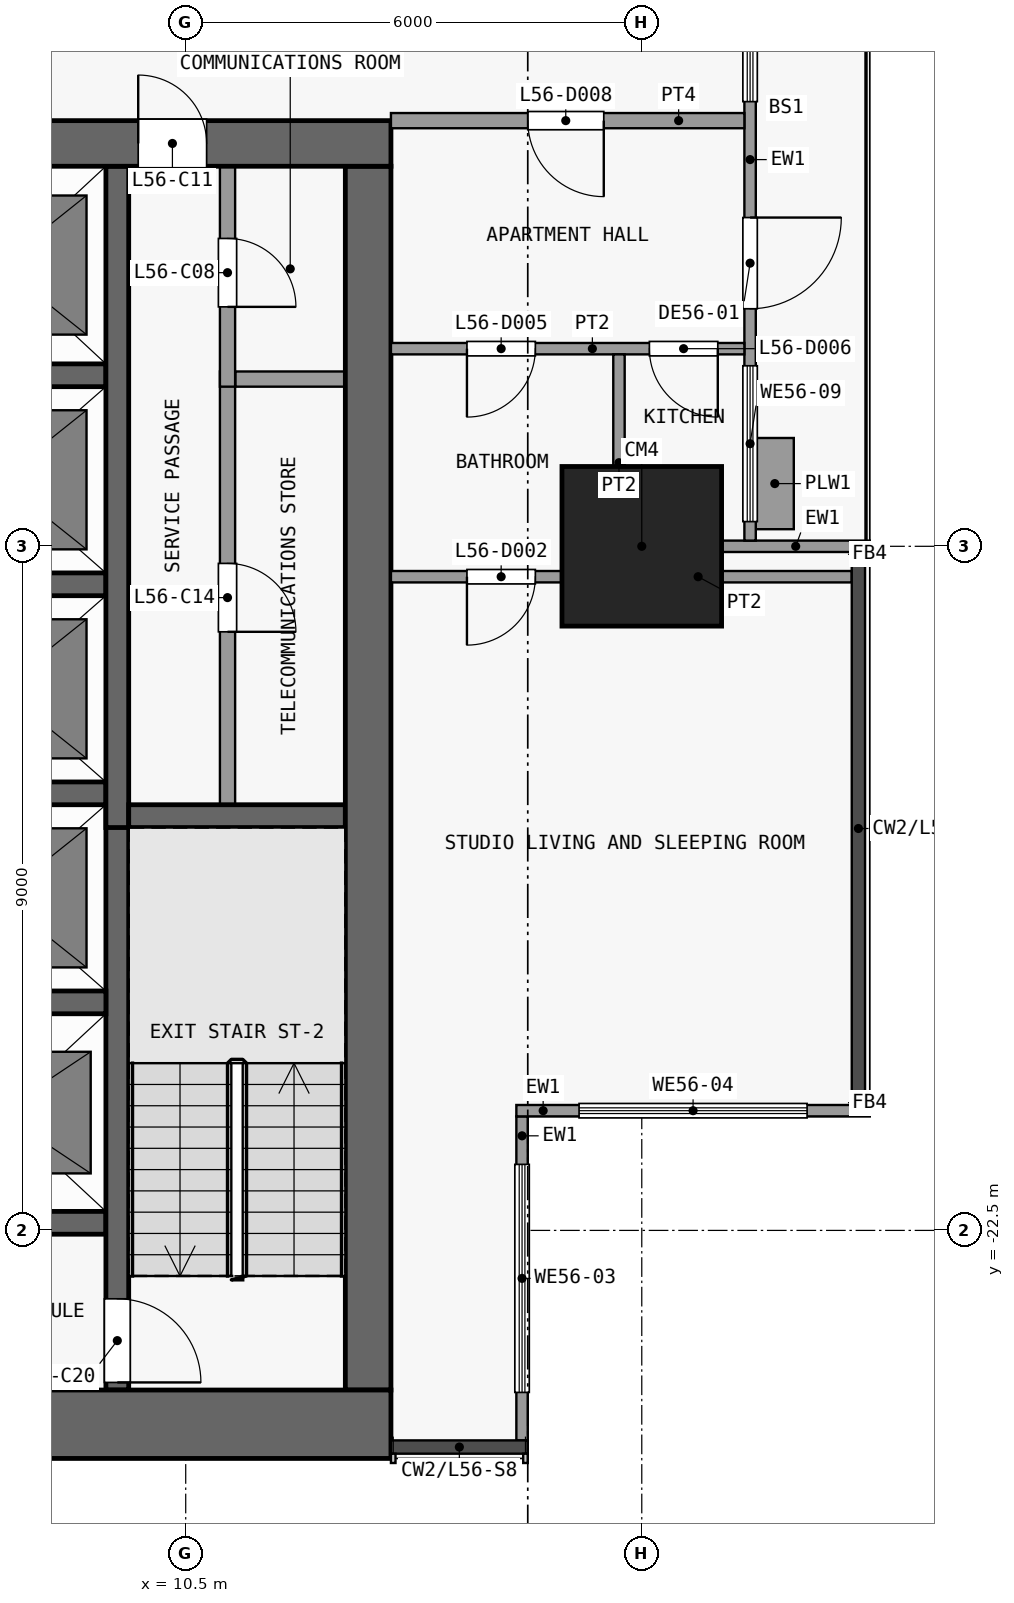
"""IFC4 building model, lengths in metres.
Left out: names, types, materials, properties, quantities, classifications, styles, units other than length and angle.
Written with IfcOpenShell. Run it as: python <this file> out.ifc"""

import sys

from ifc_helpers import new_model, si_unit, direction, frame, frame_2d, origin, origin_2d, place, context, subcontext, project, spatial, rectangle, extrude, element, fill, save


model = new_model("IFC4")
c1 = context("Model", 3, precision=1e-05, world=origin(), true_north=direction((0.0, 1.0)))
c2 = subcontext(c1, "Body", "Model", "MODEL_VIEW")
j1 = project(units=[si_unit("LENGTHUNIT", "METRE"), si_unit("PLANEANGLEUNIT", "RADIAN")], contexts=[c1])
p1 = place(None, origin())
s1 = spatial("IfcSite", under=j1, at=p1, CompositionType="ELEMENT")
p2 = place(p1, origin())
s2 = spatial("IfcBuilding", under=s1, at=p2, CompositionType="ELEMENT")
p3 = place(p2, frame((0.0, 0.0, 223.1)))
s3 = spatial("IfcBuildingStorey", under=s2, at=p3, CompositionType="ELEMENT", Elevation=223.1)
p4 = place(p3, frame((16.5, -13.5, 0.0), z_axis=(0.0, 0.0, 1.0), x_axis=(1.0, 0.0, 0.0)))
e1 = element("IfcColumn", 1, at=p4, inside=s3, PredefinedType="COLUMN", context=c2, shape_type="SweptSolid", body=[
    extrude(rectangle(XDim=2.1, YDim=2.1, at=origin_2d()), origin(), (0.0, 0.0, 1.0), 3.6),
])
p5 = place(p3, frame((-13.2, -25.05, 0.0), z_axis=(0.0, 0.0, 1.0), x_axis=(1.0, 0.0, 0.0)))
e2 = element("IfcWall", 2, at=p5, inside=s3, PredefinedType="SHEAR", context=c2, shape_type="SweptSolid", body=[
    extrude(rectangle(XDim=26.4, YDim=0.9, at=frame_2d((13.2, 0.0))), origin(), (0.0, 0.0, 1.0), 3.3),
])
p6 = place(p3, frame((-13.2, -8.2, 0.0), z_axis=(0.0, 0.0, 1.0), x_axis=(1.0, 0.0, 0.0)))
e3 = element("IfcWall", 3, at=p6, inside=s3, PredefinedType="SHEAR", context=c2, shape_type="SweptSolid", body=[
    extrude(rectangle(XDim=26.4, YDim=0.6, at=frame_2d((13.2, 0.0))), origin(), (0.0, 0.0, 1.0), 3.3),
])
p7 = place(p6, frame((7.5, 0.0, 0.0)))
e4 = element("IfcOpeningElement", 4, at=p7, cuts=e3, PredefinedType="OPENING", context=c2, shape_type="SweptSolid", body=[
    extrude(rectangle(XDim=1.8, YDim=2.1, at=frame_2d((0.9, 1.05))), frame((0.0, 0.31, 0.0), z_axis=(0.0, -1.0, 0.0), x_axis=(1.0, 0.0, 0.0)), (0.0, 0.0, 1.0), 0.62),
])
p8 = place(p6, frame((17.1, 0.0, 0.0)))
e5 = element("IfcOpeningElement", 5, at=p8, cuts=e3, PredefinedType="OPENING", context=c2, shape_type="SweptSolid", body=[
    extrude(rectangle(XDim=1.8, YDim=2.1, at=frame_2d((0.9, 1.05))), frame((0.0, 0.31, 0.0), z_axis=(0.0, -1.0, 0.0), x_axis=(1.0, 0.0, 0.0)), (0.0, 0.0, 1.0), 0.62),
])
p9 = place(p6, frame((2.425, 0.0, 0.0)))
e6 = element("IfcOpeningElement", 6, at=p9, cuts=e3, PredefinedType="OPENING", context=c2, shape_type="SweptSolid", body=[
    extrude(rectangle(XDim=0.9, YDim=2.1, at=frame_2d((0.45, 1.05))), frame((0.0, 0.31, 0.0), z_axis=(0.0, -1.0, 0.0), x_axis=(1.0, 0.0, 0.0)), (0.0, 0.0, 1.0), 0.62),
])
p10 = place(p6, frame((23.075, 0.0, 0.0)))
e7 = element("IfcOpeningElement", 7, at=p10, cuts=e3, PredefinedType="OPENING", context=c2, shape_type="SweptSolid", body=[
    extrude(rectangle(XDim=0.9, YDim=2.1, at=frame_2d((0.45, 1.05))), frame((0.0, 0.31, 0.0), z_axis=(0.0, -1.0, 0.0), x_axis=(1.0, 0.0, 0.0)), (0.0, 0.0, 1.0), 0.62),
])
p11 = place(p3, frame((12.9, -24.6, 0.0), z_axis=(0.0, 0.0, 1.0), x_axis=(0.0, 1.0, 0.0)))
e8 = element("IfcWall", 8, at=p11, inside=s3, PredefinedType="SHEAR", context=c2, shape_type="SweptSolid", body=[
    extrude(rectangle(XDim=16.1, YDim=0.6, at=frame_2d((8.05, 0.0))), origin(), (0.0, 0.0, 1.0), 3.3),
])
for number, where, z_axis, x_axis in (
    (9, (6.65, -22.4, 0.0), (0.0, 0.0, 1.0), (1.0, 0.0, 0.0)),
    (10, (6.65, -19.5, 0.0), (0.0, 0.0, 1.0), (1.0, 0.0, 0.0)),
):
    element("IfcWall", number, at=place(p3, frame(where, z_axis=z_axis, x_axis=x_axis)), inside=s3, PredefinedType="SHEAR", context=c2, shape_type="SweptSolid", body=[
        extrude(rectangle(XDim=2.8, YDim=0.3, at=frame_2d((1.4, 0.0))), origin(), (0.0, 0.0, 1.0), 3.3),
    ])
p12 = place(p3, frame((9.75, -17.05, 0.0), z_axis=(0.0, 0.0, 1.0), x_axis=(1.0, 0.0, 0.0)))
e11 = element("IfcWall", 11, at=p12, inside=s3, PredefinedType="SHEAR", context=c2, shape_type="SweptSolid", body=[
    extrude(rectangle(XDim=2.85, YDim=0.3, at=frame_2d((1.425, 0.0))), origin(), (0.0, 0.0, 1.0), 3.3),
])
for number, where, z_axis, x_axis in (
    (12, (6.65, -16.75, 0.0), (0.0, 0.0, 1.0), (1.0, 0.0, 0.0)),
    (13, (6.65, -14.0, 0.0), (0.0, 0.0, 1.0), (1.0, 0.0, 0.0)),
):
    element("IfcWall", number, at=place(p3, frame(where, z_axis=z_axis, x_axis=x_axis)), inside=s3, PredefinedType="SHEAR", context=c2, shape_type="SweptSolid", body=[
        extrude(rectangle(XDim=2.8, YDim=0.3, at=frame_2d((1.4, 0.0))), origin(), (0.0, 0.0, 1.0), 3.3),
    ])
p13 = place(p3, frame((11.15, -11.3, 0.0), z_axis=(0.0, 0.0, 1.0), x_axis=(1.0, 0.0, 0.0)))
e14 = element("IfcWall", 14, at=p13, inside=s3, PredefinedType="PARTITIONING", context=c2, shape_type="SweptSolid", body=[
    extrude(rectangle(XDim=1.45, YDim=0.2, at=frame_2d((0.725, 0.0))), origin(), (0.0, 0.0, 1.0), 3.3),
])
p14 = place(p3, frame((6.65, -11.25, 0.0), z_axis=(0.0, 0.0, 1.0), x_axis=(1.0, 0.0, 0.0)))
e15 = element("IfcWall", 15, at=p14, inside=s3, PredefinedType="SHEAR", context=c2, shape_type="SweptSolid", body=[
    extrude(rectangle(XDim=2.8, YDim=0.3, at=frame_2d((1.4, 0.0))), origin(), (0.0, 0.0, 1.0), 3.3),
])
p15 = place(p3, frame((9.6, -16.9, 0.0), z_axis=(0.0, 0.0, 1.0), x_axis=(0.0, -1.0, 0.0)))
e16 = element("IfcWall", 16, at=p15, inside=s3, PredefinedType="SHEAR", context=c2, shape_type="SweptSolid", body=[
    extrude(rectangle(XDim=7.7, YDim=0.3, at=frame_2d((3.85, 0.0))), origin(), (0.0, 0.0, 1.0), 3.3),
])
p16 = place(p15, frame((6.5, 0.0, 0.0)))
e17 = element("IfcOpeningElement", 17, at=p16, cuts=e16, PredefinedType="OPENING", context=c2, shape_type="SweptSolid", body=[
    extrude(rectangle(XDim=1.1, YDim=2.1, at=frame_2d((0.55, 1.05))), frame((0.0, 0.16, 0.0), z_axis=(0.0, -1.0, 0.0), x_axis=(1.0, 0.0, 0.0)), (0.0, 0.0, 1.0), 0.32),
])
p17 = place(p3, frame((9.6, -17.2, 0.0), z_axis=(0.0, 0.0, 1.0), x_axis=(0.0, 1.0, 0.0)))
e18 = element("IfcWall", 18, at=p17, inside=s3, PredefinedType="SHEAR", context=c2, shape_type="SweptSolid", body=[
    extrude(rectangle(XDim=8.7, YDim=0.3, at=frame_2d((4.35, 0.0))), origin(), (0.0, 0.0, 1.0), 3.3),
])
p18 = place(p3, frame((11.05, -11.2, 0.0), z_axis=(0.0, 0.0, 1.0), x_axis=(0.0, -1.0, 0.0)))
e19 = element("IfcWall", 19, at=p18, inside=s3, PredefinedType="PARTITIONING", context=c2, shape_type="SweptSolid", body=[
    extrude(rectangle(XDim=5.7, YDim=0.2, at=frame_2d((2.85, 0.0))), origin(), (0.0, 0.0, 1.0), 3.3),
])
p19 = place(p18, frame((2.525, 0.0, 0.0)))
e20 = element("IfcOpeningElement", 20, at=p19, cuts=e19, PredefinedType="OPENING", context=c2, shape_type="SweptSolid", body=[
    extrude(rectangle(XDim=0.9, YDim=2.1, at=frame_2d((0.45, 1.05))), frame((0.0, 0.11, 0.0), z_axis=(0.0, -1.0, 0.0), x_axis=(1.0, 0.0, 0.0)), (0.0, 0.0, 1.0), 0.22),
])
p20 = place(p3, frame((11.05, -8.5, 0.0), z_axis=(0.0, 0.0, 1.0), x_axis=(0.0, -1.0, 0.0)))
e21 = element("IfcWall", 21, at=p20, inside=s3, PredefinedType="PARTITIONING", context=c2, shape_type="SweptSolid", body=[
    extrude(rectangle(XDim=2.9, YDim=0.2, at=frame_2d((1.45, 0.0))), origin(), (0.0, 0.0, 1.0), 3.3),
])
p21 = place(p20, frame((0.95, 0.0, 0.0)))
e22 = element("IfcOpeningElement", 22, at=p21, cuts=e21, PredefinedType="OPENING", context=c2, shape_type="SweptSolid", body=[
    extrude(rectangle(XDim=0.9, YDim=2.1, at=frame_2d((0.45, 1.05))), frame((0.0, 0.11, 0.0), z_axis=(0.0, -1.0, 0.0), x_axis=(1.0, 0.0, 0.0)), (0.0, 0.0, 1.0), 0.22),
])
p22 = place(p3, frame((14.925, -21.0, 0.0), z_axis=(0.0, 0.0, 1.0), x_axis=(0.0, -1.0, 0.0)))
e23 = element("IfcWall", 23, at=p22, inside=s3, PredefinedType="SOLIDWALL", context=c2, shape_type="SweptSolid", body=[
    extrude(rectangle(XDim=4.262, YDim=0.15, at=frame_2d((2.131, 0.0))), origin(), (0.0, 0.0, 1.0), 3.3),
])
p23 = place(p22, frame((0.631, 0.0, 0.9)))
e24 = element("IfcOpeningElement", 24, at=p23, cuts=e23, PredefinedType="OPENING", context=c2, shape_type="SweptSolid", body=[
    extrude(rectangle(XDim=3.0, YDim=2.4, at=frame_2d((1.5, 1.2))), frame((0.0, 0.085, 0.0), z_axis=(0.0, -1.0, 0.0), x_axis=(1.0, 0.0, 0.0)), (0.0, 0.0, 1.0), 0.17),
])
p24 = place(p3, frame((19.5, -20.925, 0.0), z_axis=(0.0, 0.0, 1.0), x_axis=(-1.0, 0.0, 0.0)))
e25 = element("IfcWall", 25, at=p24, inside=s3, PredefinedType="SOLIDWALL", context=c2, shape_type="SweptSolid", body=[
    extrude(rectangle(XDim=4.65, YDim=0.15, at=frame_2d((2.325, 0.0))), origin(), (0.0, 0.0, 1.0), 3.3),
])
p25 = place(p24, frame((0.825, 0.0, 0.9)))
e26 = element("IfcOpeningElement", 26, at=p25, cuts=e25, PredefinedType="OPENING", context=c2, shape_type="SweptSolid", body=[
    extrude(rectangle(XDim=3.0, YDim=2.4, at=frame_2d((1.5, 1.2))), frame((0.0, 0.085, 0.0), z_axis=(0.0, -1.0, 0.0), x_axis=(1.0, 0.0, 0.0)), (0.0, 0.0, 1.0), 0.17),
])
p26 = place(p3, frame((17.55, -13.5, 0.0), z_axis=(0.0, 0.0, 1.0), x_axis=(1.0, 0.0, 0.0)))
e27 = element("IfcWall", 27, at=p26, inside=s3, PredefinedType="SOLIDWALL", context=c2, shape_type="SweptSolid", body=[
    extrude(rectangle(XDim=1.95, YDim=0.15, at=frame_2d((0.975, 0.0))), origin(), (0.0, 0.0, 1.0), 3.3),
])
p27 = place(p3, frame((17.925, -4.575, 0.0), z_axis=(0.0, 0.0, 1.0), x_axis=(0.0, -1.0, 0.0)))
e28 = element("IfcWall", 28, at=p27, inside=s3, PredefinedType="SOLIDWALL", context=c2, shape_type="SweptSolid", body=[
    extrude(rectangle(XDim=8.85, YDim=0.15, at=frame_2d((4.425, 0.0))), origin(), (0.0, 0.0, 1.0), 3.3),
])
p28 = place(p27, frame((4.6, 0.0, 0.0)))
e29 = element("IfcOpeningElement", 29, at=p28, cuts=e28, PredefinedType="OPENING", context=c2, shape_type="SweptSolid", body=[
    extrude(rectangle(XDim=1.2, YDim=2.4, at=frame_2d((0.6, 1.2))), frame((0.0, 0.085, 0.0), z_axis=(0.0, -1.0, 0.0), x_axis=(1.0, 0.0, 0.0)), (0.0, 0.0, 1.0), 0.17),
])
p29 = place(p27, frame((6.55, 0.0, 0.9)))
e30 = element("IfcOpeningElement", 30, at=p29, cuts=e28, PredefinedType="OPENING", context=c2, shape_type="SweptSolid", body=[
    extrude(rectangle(XDim=2.05, YDim=2.1, at=frame_2d((1.025, 1.05))), frame((0.0, 0.085, 0.0), z_axis=(0.0, -1.0, 0.0), x_axis=(1.0, 0.0, 0.0)), (0.0, 0.0, 1.0), 0.17),
])
p30 = place(p27, frame((0.8, 0.0, 0.9)))
e31 = element("IfcOpeningElement", 31, at=p30, cuts=e28, PredefinedType="OPENING", context=c2, shape_type="SweptSolid", body=[
    extrude(rectangle(XDim=2.275, YDim=2.1, at=frame_2d((1.137, 1.05))), frame((0.0, 0.085, 0.0), z_axis=(0.0, -1.0, 0.0), x_axis=(1.0, 0.0, 0.0)), (0.0, 0.0, 1.0), 0.17),
])
p31 = place(p3, frame((18.25, -13.275, 0.0), z_axis=(0.0, 0.0, 1.0), x_axis=(0.0, 1.0, 0.0)))
e32 = element("IfcWall", 32, at=p31, inside=s3, PredefinedType="USERDEFINED", context=c2, shape_type="SweptSolid", body=[
    extrude(rectangle(XDim=1.2, YDim=0.5, at=frame_2d((0.6, 0.0))), origin(), (0.0, 0.0, 1.0), 0.9),
])
p32 = place(p3, frame((13.2, -13.9, 0.0), z_axis=(0.0, 0.0, 1.0), x_axis=(1.0, 0.0, 0.0)))
e33 = element("IfcWall", 33, at=p32, inside=s3, PredefinedType="PARTITIONING", context=c2, shape_type="SweptSolid", body=[
    extrude(rectangle(XDim=6.062, YDim=0.15, at=frame_2d((3.031, 0.0))), origin(), (0.0, 0.0, 1.0), 3.3),
])
p33 = place(p32, frame((1.0, 0.0, 0.0)))
e34 = element("IfcOpeningElement", 34, at=p33, cuts=e33, PredefinedType="OPENING", context=c2, shape_type="SweptSolid", body=[
    extrude(rectangle(XDim=0.9, YDim=2.1, at=frame_2d((0.45, 1.05))), frame((0.0, 0.085, 0.0), z_axis=(0.0, -1.0, 0.0), x_axis=(1.0, 0.0, 0.0)), (0.0, 0.0, 1.0), 0.17),
])
p34 = place(p3, frame((13.2, -10.9, 0.0), z_axis=(0.0, 0.0, 1.0), x_axis=(1.0, 0.0, 0.0)))
e35 = element("IfcWall", 35, at=p34, inside=s3, PredefinedType="PARTITIONING", context=c2, shape_type="SweptSolid", body=[
    extrude(rectangle(XDim=4.65, YDim=0.15, at=frame_2d((2.325, 0.0))), origin(), (0.0, 0.0, 1.0), 3.3),
])
p35 = place(p34, frame((1.0, 0.0, 0.0)))
e36 = element("IfcOpeningElement", 36, at=p35, cuts=e35, PredefinedType="OPENING", context=c2, shape_type="SweptSolid", body=[
    extrude(rectangle(XDim=0.9, YDim=2.1, at=frame_2d((0.45, 1.05))), frame((0.0, 0.085, 0.0), z_axis=(0.0, -1.0, 0.0), x_axis=(1.0, 0.0, 0.0)), (0.0, 0.0, 1.0), 0.17),
])
p36 = place(p34, frame((3.4, 0.0, 0.0)))
e37 = element("IfcOpeningElement", 37, at=p36, cuts=e35, PredefinedType="OPENING", context=c2, shape_type="SweptSolid", body=[
    extrude(rectangle(XDim=0.9, YDim=2.1, at=frame_2d((0.45, 1.05))), frame((0.0, 0.085, 0.0), z_axis=(0.0, -1.0, 0.0), x_axis=(1.0, 0.0, 0.0)), (0.0, 0.0, 1.0), 0.17),
])
p37 = place(p3, frame((13.2, -7.9, 0.0), z_axis=(0.0, 0.0, 1.0), x_axis=(1.0, 0.0, 0.0)))
e38 = element("IfcWall", 38, at=p37, inside=s3, PredefinedType="PARTITIONING", context=c2, shape_type="SweptSolid", body=[
    extrude(rectangle(XDim=4.65, YDim=0.2, at=frame_2d((2.325, 0.0))), origin(), (0.0, 0.0, 1.0), 3.3),
])
p38 = place(p37, frame((1.8, 0.0, 0.0)))
e39 = element("IfcOpeningElement", 39, at=p38, cuts=e38, PredefinedType="OPENING", context=c2, shape_type="SweptSolid", body=[
    extrude(rectangle(XDim=1.0, YDim=2.1, at=frame_2d((0.5, 1.05))), frame((0.0, 0.11, 0.0), z_axis=(0.0, -1.0, 0.0), x_axis=(1.0, 0.0, 0.0)), (0.0, 0.0, 1.0), 0.22),
])
p39 = place(p3, frame((16.2, -13.825, 0.0), z_axis=(0.0, 0.0, 1.0), x_axis=(0.0, 1.0, 0.0)))
e40 = element("IfcWall", 40, at=p39, inside=s3, PredefinedType="PARTITIONING", context=c2, shape_type="SweptSolid", body=[
    extrude(rectangle(XDim=2.85, YDim=0.15, at=frame_2d((1.425, 0.0))), origin(), (0.0, 0.0, 1.0), 3.3),
])
p40 = place(p21, origin())
e41 = element("IfcDoor", 41, at=p40, inside=s3, OperationType="SINGLE_SWING_RIGHT", PredefinedType="DOOR", context=c2, shape_type="SweptSolid", body=[
    extrude(rectangle(XDim=0.9, YDim=2.1, at=frame_2d((0.45, 1.05))), frame((0.0, 0.025, 0.0), z_axis=(0.0, -1.0, 0.0), x_axis=(1.0, 0.0, 0.0)), (0.0, 0.0, 1.0), 0.05),
])
fill(e22, e41)
p41 = place(p10, origin())
e42 = element("IfcDoor", 42, at=p41, inside=s3, OperationType="SINGLE_SWING_LEFT", PredefinedType="DOOR", context=c2, shape_type="SweptSolid", body=[
    extrude(rectangle(XDim=0.9, YDim=2.1, at=frame_2d((0.45, 1.05))), frame((0.0, 0.025, 0.0), z_axis=(0.0, -1.0, 0.0), x_axis=(1.0, 0.0, 0.0)), (0.0, 0.0, 1.0), 0.05),
])
fill(e7, e42)
p42 = place(p19, origin())
e43 = element("IfcDoor", 43, at=p42, inside=s3, OperationType="SINGLE_SWING_RIGHT", PredefinedType="DOOR", context=c2, shape_type="SweptSolid", body=[
    extrude(rectangle(XDim=0.9, YDim=2.1, at=frame_2d((0.45, 1.05))), frame((0.0, 0.025, 0.0), z_axis=(0.0, -1.0, 0.0), x_axis=(1.0, 0.0, 0.0)), (0.0, 0.0, 1.0), 0.05),
])
fill(e20, e43)
p43 = place(p16, origin())
e44 = element("IfcDoor", 44, at=p43, inside=s3, OperationType="SINGLE_SWING_RIGHT", PredefinedType="DOOR", context=c2, shape_type="SweptSolid", body=[
    extrude(rectangle(XDim=1.1, YDim=2.1, at=frame_2d((0.55, 1.05))), frame((0.0, 0.025, 0.0), z_axis=(0.0, -1.0, 0.0), x_axis=(1.0, 0.0, 0.0)), (0.0, 0.0, 1.0), 0.05),
])
fill(e17, e44)
p44 = place(p23, origin())
e45 = element("IfcWindow", 45, at=p44, inside=s3, PartitioningType="SINGLE_PANEL", PredefinedType="WINDOW", context=c2, shape_type="SweptSolid", body=[
    extrude(rectangle(XDim=3.0, YDim=2.4, at=frame_2d((1.5, 1.2))), frame((0.0, 0.03, 0.0), z_axis=(0.0, -1.0, 0.0), x_axis=(1.0, 0.0, 0.0)), (0.0, 0.0, 1.0), 0.06),
])
fill(e24, e45)
p45 = place(p25, origin())
e46 = element("IfcWindow", 46, at=p45, inside=s3, PartitioningType="SINGLE_PANEL", PredefinedType="WINDOW", context=c2, shape_type="SweptSolid", body=[
    extrude(rectangle(XDim=3.0, YDim=2.4, at=frame_2d((1.5, 1.2))), frame((0.0, 0.03, 0.0), z_axis=(0.0, -1.0, 0.0), x_axis=(1.0, 0.0, 0.0)), (0.0, 0.0, 1.0), 0.06),
])
fill(e26, e46)
p46 = place(p28, origin())
e47 = element("IfcDoor", 47, at=p46, inside=s3, OperationType="SINGLE_SWING_LEFT", PredefinedType="DOOR", context=c2, shape_type="SweptSolid", body=[
    extrude(rectangle(XDim=1.2, YDim=2.4, at=frame_2d((0.6, 1.2))), frame((0.0, 0.025, 0.0), z_axis=(0.0, -1.0, 0.0), x_axis=(1.0, 0.0, 0.0)), (0.0, 0.0, 1.0), 0.05),
])
fill(e29, e47)
p47 = place(p29, origin())
e48 = element("IfcWindow", 48, at=p47, inside=s3, PartitioningType="SINGLE_PANEL", PredefinedType="WINDOW", context=c2, shape_type="SweptSolid", body=[
    extrude(rectangle(XDim=2.05, YDim=2.1, at=frame_2d((1.025, 1.05))), frame((0.0, 0.03, 0.0), z_axis=(0.0, -1.0, 0.0), x_axis=(1.0, 0.0, 0.0)), (0.0, 0.0, 1.0), 0.06),
])
fill(e30, e48)
p48 = place(p30, origin())
e49 = element("IfcWindow", 49, at=p48, inside=s3, PartitioningType="SINGLE_PANEL", PredefinedType="WINDOW", context=c2, shape_type="SweptSolid", body=[
    extrude(rectangle(XDim=2.275, YDim=2.1, at=frame_2d((1.137, 1.05))), frame((0.0, 0.03, 0.0), z_axis=(0.0, -1.0, 0.0), x_axis=(1.0, 0.0, 0.0)), (0.0, 0.0, 1.0), 0.06),
])
fill(e31, e49)
p49 = place(p33, origin())
e50 = element("IfcDoor", 50, at=p49, inside=s3, OperationType="SINGLE_SWING_LEFT", PredefinedType="DOOR", context=c2, shape_type="SweptSolid", body=[
    extrude(rectangle(XDim=0.9, YDim=2.1, at=frame_2d((0.45, 1.05))), frame((0.0, 0.025, 0.0), z_axis=(0.0, -1.0, 0.0), x_axis=(1.0, 0.0, 0.0)), (0.0, 0.0, 1.0), 0.05),
])
fill(e34, e50)
p50 = place(p35, origin())
e51 = element("IfcDoor", 51, at=p50, inside=s3, OperationType="SINGLE_SWING_LEFT", PredefinedType="DOOR", context=c2, shape_type="SweptSolid", body=[
    extrude(rectangle(XDim=0.9, YDim=2.1, at=frame_2d((0.45, 1.05))), frame((0.0, 0.025, 0.0), z_axis=(0.0, -1.0, 0.0), x_axis=(1.0, 0.0, 0.0)), (0.0, 0.0, 1.0), 0.05),
])
fill(e36, e51)
p51 = place(p36, origin())
e52 = element("IfcDoor", 52, at=p51, inside=s3, OperationType="SINGLE_SWING_RIGHT", PredefinedType="DOOR", context=c2, shape_type="SweptSolid", body=[
    extrude(rectangle(XDim=0.9, YDim=2.1, at=frame_2d((0.45, 1.05))), frame((0.0, 0.025, 0.0), z_axis=(0.0, -1.0, 0.0), x_axis=(1.0, 0.0, 0.0)), (0.0, 0.0, 1.0), 0.05),
])
fill(e37, e52)
p52 = place(p38, origin())
e53 = element("IfcDoor", 53, at=p52, inside=s3, OperationType="SINGLE_SWING_RIGHT", PredefinedType="DOOR", context=c2, shape_type="SweptSolid", body=[
    extrude(rectangle(XDim=1.0, YDim=2.1, at=frame_2d((0.5, 1.05))), frame((0.0, 0.025, 0.0), z_axis=(0.0, -1.0, 0.0), x_axis=(1.0, 0.0, 0.0)), (0.0, 0.0, 1.0), 0.05),
])
fill(e39, e53)
save(model, sys.argv[1])
